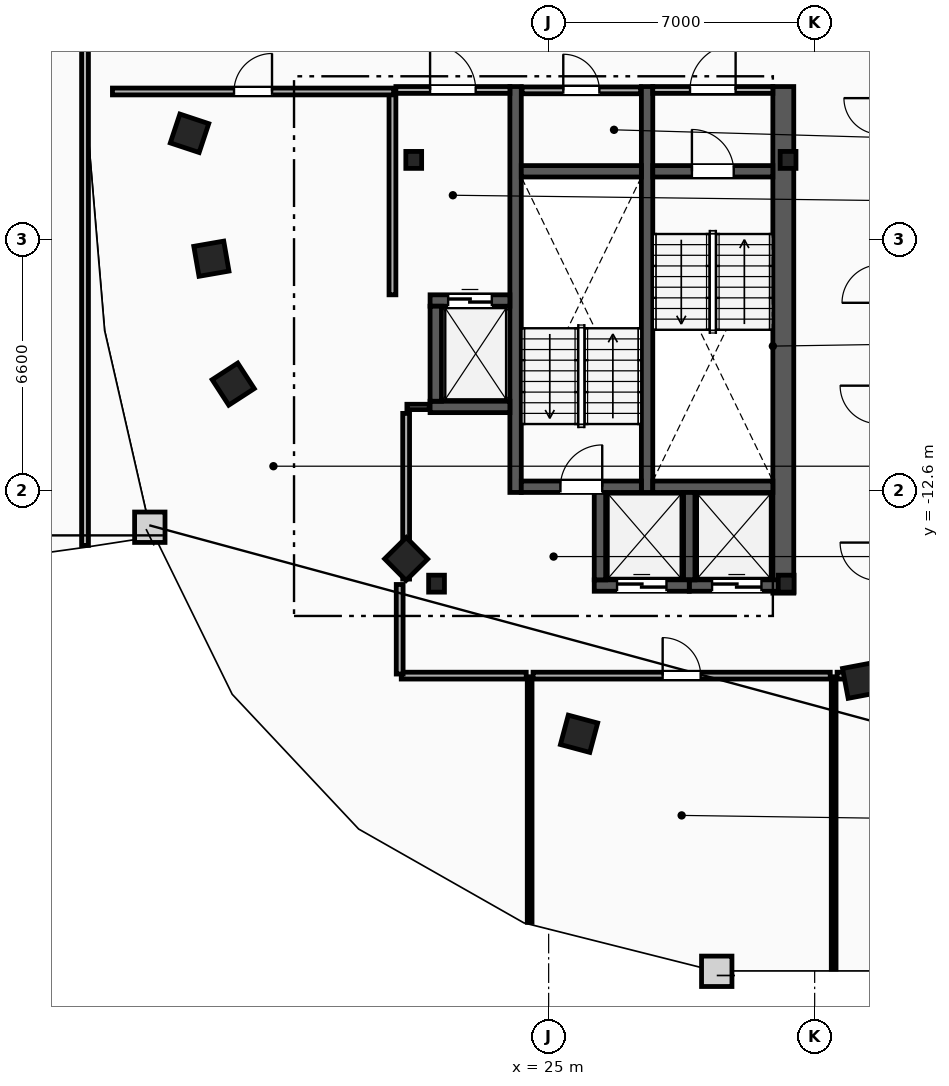
"""IFC4 building model, lengths in metres.
Left out: names, types, materials, properties, quantities, classifications, styles, units other than length and angle.
Written with IfcOpenShell. Run it as: python <this file> out.ifc"""

import sys

from ifc_helpers import new_model, si_unit, direction, frame, frame_2d, origin, origin_2d, place, context, subcontext, project, spatial, rectangle, i_section, extrude, element, fill, save


model = new_model("IFC4")
c1 = context("Model", 3, precision=1e-05, world=origin(), true_north=direction((0.0, 1.0)))
c2 = subcontext(c1, "Body", "Model", "MODEL_VIEW")
j1 = project(units=[si_unit("LENGTHUNIT", "METRE"), si_unit("PLANEANGLEUNIT", "RADIAN")], contexts=[c1])
p1 = place(None, origin())
s1 = spatial("IfcSite", under=j1, at=p1, CompositionType="ELEMENT")
p2 = place(p1, origin())
s2 = spatial("IfcBuilding", under=s1, at=p2, CompositionType="ELEMENT")
p3 = place(p2, frame((0.0, 0.0, 264.8)))
s3 = spatial("IfcBuildingStorey", under=s2, at=p3, CompositionType="ELEMENT", Elevation=264.8)
for number, where, z_axis, x_axis in (
    (1, (31.3, -3.9, 0.0), (0.0, 0.0, 1.0), (1.0, 0.0, 0.0)),
    (2, (21.45, -3.9, 0.0), (0.0, 0.0, 1.0), (1.0, 0.0, 0.0)),
    (3, (22.05, -15.05, 0.0), (0.0, 0.0, 1.0), (1.0, 0.0, 0.0)),
    (4, (31.25, -15.05, 0.0), (0.0, 0.0, 1.0), (1.0, 0.0, 0.0)),
):
    element("IfcColumn", number, at=place(p3, frame(where, z_axis=z_axis, x_axis=x_axis)), inside=s3, PredefinedType="COLUMN", context=c2, shape_type="SweptSolid", body=[
        extrude(i_section(OverallWidth=0.416, OverallDepth=0.446, WebThickness=0.039, FlangeThickness=0.063, FilletRadius=0.018, at=origin_2d()), origin(), (0.0, 0.0, 1.0), 3.6),
    ])
for number, where, z_axis, x_axis in (
    (5, (15.55, -3.2, 0.0), (0.0, 0.0, 1.0), (-0.315, -0.949, 0.0)),
    (6, (16.125, -6.5, 0.0), (0.0, 0.0, 1.0), (0.172, -0.985, 0.0)),
    (7, (16.7, -9.8, 0.0), (0.0, 0.0, 1.0), (0.544, -0.839, 0.0)),
    (8, (21.25, -14.4, 0.0), (0.0, 0.0, 1.0), (0.703, -0.711, 0.0)),
    (9, (25.8, -19.0, 0.0), (0.0, 0.0, 1.0), (0.966, -0.259, 0.0)),
    (10, (33.2, -17.6, 0.0), (0.0, 0.0, 1.0), (0.983, 0.186, 0.0)),
):
    element("IfcColumn", number, at=place(p3, frame(where, z_axis=z_axis, x_axis=x_axis)), inside=s3, PredefinedType="COLUMN", context=c2, shape_type="SweptSolid", body=[
        extrude(rectangle(XDim=0.8, YDim=0.8, at=origin_2d()), origin(), (0.0, 0.0, 1.0), 3.6),
    ])
p4 = place(p3, frame((31.175, -15.3, 0.0), z_axis=(0.0, 0.0, 1.0), x_axis=(0.0, 1.0, 0.0)))
e11 = element("IfcWall", 11, at=p4, inside=s3, PredefinedType="SHEAR", context=c2, shape_type="SweptSolid", body=[
    extrude(rectangle(XDim=13.33, YDim=0.55, at=frame_2d((6.665, 0.0))), origin(), (0.0, 0.0, 1.0), 3.34),
])
for number, where, z_axis, x_axis in (
    (12, (27.59, -12.65, 0.0), (0.0, 0.0, 1.0), (0.0, 1.0, 0.0)),
    (13, (24.13, -12.65, 0.0), (0.0, 0.0, 1.0), (0.0, 1.0, 0.0)),
):
    element("IfcWall", number, at=place(p3, frame(where, z_axis=z_axis, x_axis=x_axis)), inside=s3, PredefinedType="SHEAR", context=c2, shape_type="SweptSolid", body=[
        extrude(rectangle(XDim=10.68, YDim=0.3, at=frame_2d((5.34, 0.0))), origin(), (0.0, 0.0, 1.0), 3.34),
    ])
p5 = place(p3, frame((27.74, -4.2, 0.0), z_axis=(0.0, 0.0, 1.0), x_axis=(1.0, 0.0, 0.0)))
e14 = element("IfcWall", 14, at=p5, inside=s3, PredefinedType="SHEAR", context=c2, shape_type="SweptSolid", body=[
    extrude(rectangle(XDim=3.16, YDim=0.3, at=frame_2d((1.58, 0.0))), origin(), (0.0, 0.0, 1.0), 3.34),
])
p6 = place(p5, frame((1.03, 0.0, 0.0)))
e15 = element("IfcOpeningElement", 15, at=p6, cuts=e14, PredefinedType="OPENING", context=c2, shape_type="SweptSolid", body=[
    extrude(rectangle(XDim=1.1, YDim=2.15, at=frame_2d((0.55, 1.075))), frame((0.0, 0.16, 0.0), z_axis=(0.0, -1.0, 0.0), x_axis=(1.0, 0.0, 0.0)), (0.0, 0.0, 1.0), 0.32),
])
p7 = place(p3, frame((27.74, -12.5, 0.0), z_axis=(0.0, 0.0, 1.0), x_axis=(1.0, 0.0, 0.0)))
e16 = element("IfcWall", 16, at=p7, inside=s3, PredefinedType="SHEAR", context=c2, shape_type="SweptSolid", body=[
    extrude(rectangle(XDim=3.16, YDim=0.3, at=frame_2d((1.58, 0.0))), origin(), (0.0, 0.0, 1.0), 3.34),
])
p8 = place(p3, frame((24.28, -12.5, 0.0), z_axis=(0.0, 0.0, 1.0), x_axis=(1.0, 0.0, 0.0)))
e17 = element("IfcWall", 17, at=p8, inside=s3, PredefinedType="SHEAR", context=c2, shape_type="SweptSolid", body=[
    extrude(rectangle(XDim=3.16, YDim=0.3, at=frame_2d((1.58, 0.0))), origin(), (0.0, 0.0, 1.0), 3.34),
])
p9 = place(p8, frame((1.03, 0.0, 0.0)))
e18 = element("IfcOpeningElement", 18, at=p9, cuts=e17, PredefinedType="OPENING", context=c2, shape_type="SweptSolid", body=[
    extrude(rectangle(XDim=1.1, YDim=2.15, at=frame_2d((0.55, 1.075))), frame((0.0, 0.16, 0.0), z_axis=(0.0, -1.0, 0.0), x_axis=(1.0, 0.0, 0.0)), (0.0, 0.0, 1.0), 0.32),
])
p10 = place(p3, frame((24.28, -4.2, 0.0), z_axis=(0.0, 0.0, 1.0), x_axis=(1.0, 0.0, 0.0)))
e19 = element("IfcWall", 19, at=p10, inside=s3, PredefinedType="SHEAR", context=c2, shape_type="SweptSolid", body=[
    extrude(rectangle(XDim=3.16, YDim=0.3, at=frame_2d((1.58, 0.0))), origin(), (0.0, 0.0, 1.0), 3.34),
])
p11 = place(p3, frame((20.89, -7.45, 0.0), z_axis=(0.0, 0.0, 1.0), x_axis=(0.0, 1.0, 0.0)))
e20 = element("IfcWall", 20, at=p11, inside=s3, PredefinedType="PARTITIONING", context=c2, shape_type="SweptSolid", body=[
    extrude(rectangle(XDim=5.3, YDim=0.18, at=frame_2d((2.65, 0.0))), origin(), (0.0, 0.0, 1.0), 3.34),
])
p12 = place(p3, frame((20.98, -2.06, 0.0), z_axis=(0.0, 0.0, 1.0), x_axis=(1.0, 0.0, 0.0)))
e21 = element("IfcWall", 21, at=p12, inside=s3, PredefinedType="PARTITIONING", context=c2, shape_type="SweptSolid", body=[
    extrude(rectangle(XDim=3.0, YDim=0.18, at=frame_2d((1.5, 0.0))), origin(), (0.0, 0.0, 1.0), 3.34),
])
p13 = place(p12, frame((0.9, 0.0, 0.0)))
e22 = element("IfcOpeningElement", 22, at=p13, cuts=e21, PredefinedType="OPENING", context=c2, shape_type="SweptSolid", body=[
    extrude(rectangle(XDim=1.2, YDim=2.15, at=frame_2d((0.6, 1.075))), frame((0.0, 0.1, 0.0), z_axis=(0.0, -1.0, 0.0), x_axis=(1.0, 0.0, 0.0)), (0.0, 0.0, 1.0), 0.2),
])
p14 = place(p3, frame((27.74, -2.06, 0.0), z_axis=(0.0, 0.0, 1.0), x_axis=(1.0, 0.0, 0.0)))
e23 = element("IfcWall", 23, at=p14, inside=s3, PredefinedType="PARTITIONING", context=c2, shape_type="SweptSolid", body=[
    extrude(rectangle(XDim=3.16, YDim=0.18, at=frame_2d((1.58, 0.0))), origin(), (0.0, 0.0, 1.0), 3.34),
])
p15 = place(p14, frame((0.98, 0.0, 0.0)))
e24 = element("IfcOpeningElement", 24, at=p15, cuts=e23, PredefinedType="OPENING", context=c2, shape_type="SweptSolid", body=[
    extrude(rectangle(XDim=1.2, YDim=2.15, at=frame_2d((0.6, 1.075))), frame((0.0, 0.1, 0.0), z_axis=(0.0, -1.0, 0.0), x_axis=(1.0, 0.0, 0.0)), (0.0, 0.0, 1.0), 0.2),
])
p16 = place(p3, frame((21.88, -7.6, 0.0), z_axis=(0.0, 0.0, 1.0), x_axis=(1.0, 0.0, 0.0)))
e25 = element("IfcWall", 25, at=p16, inside=s3, PredefinedType="SHEAR", context=c2, shape_type="SweptSolid", body=[
    extrude(rectangle(XDim=2.1, YDim=0.3, at=frame_2d((1.05, 0.0))), origin(), (0.0, 0.0, 1.0), 3.34),
])
p17 = place(p16, frame((0.475, 0.0, 0.0)))
e26 = element("IfcOpeningElement", 26, at=p17, cuts=e25, PredefinedType="OPENING", context=c2, shape_type="SweptSolid", body=[
    extrude(rectangle(XDim=1.15, YDim=2.2, at=frame_2d((0.575, 1.1))), frame((0.0, 0.16, 0.0), z_axis=(0.0, -1.0, 0.0), x_axis=(1.0, 0.0, 0.0)), (0.0, 0.0, 1.0), 0.32),
])
p18 = place(p3, frame((21.88, -10.4, 0.0), z_axis=(0.0, 0.0, 1.0), x_axis=(1.0, 0.0, 0.0)))
e27 = element("IfcWall", 27, at=p18, inside=s3, PredefinedType="SHEAR", context=c2, shape_type="SweptSolid", body=[
    extrude(rectangle(XDim=2.1, YDim=0.3, at=frame_2d((1.05, 0.0))), origin(), (0.0, 0.0, 1.0), 3.34),
])
p19 = place(p3, frame((22.03, -10.25, 0.0), z_axis=(0.0, 0.0, 1.0), x_axis=(0.0, 1.0, 0.0)))
e28 = element("IfcWall", 28, at=p19, inside=s3, PredefinedType="SHEAR", context=c2, shape_type="SweptSolid", body=[
    extrude(rectangle(XDim=2.5, YDim=0.3, at=frame_2d((1.25, 0.0))), origin(), (0.0, 0.0, 1.0), 3.34),
])
p20 = place(p3, frame((28.7, -15.1, 0.0), z_axis=(0.0, 0.0, 1.0), x_axis=(1.0, 0.0, 0.0)))
e29 = element("IfcWall", 29, at=p20, inside=s3, PredefinedType="SHEAR", context=c2, shape_type="SweptSolid", body=[
    extrude(rectangle(XDim=2.5, YDim=0.3, at=frame_2d((1.25, 0.0))), origin(), (0.0, 0.0, 1.0), 3.34),
])
p21 = place(p20, frame((0.6, 0.0, 0.0)))
e30 = element("IfcOpeningElement", 30, at=p21, cuts=e29, PredefinedType="OPENING", context=c2, shape_type="SweptSolid", body=[
    extrude(rectangle(XDim=1.3, YDim=2.2, at=frame_2d((0.65, 1.1))), frame((0.0, 0.16, 0.0), z_axis=(0.0, -1.0, 0.0), x_axis=(1.0, 0.0, 0.0)), (0.0, 0.0, 1.0), 0.32),
])
p22 = place(p3, frame((28.7, -14.95, 0.0), z_axis=(0.0, 0.0, 1.0), x_axis=(0.0, 1.0, 0.0)))
e31 = element("IfcWall", 31, at=p22, inside=s3, PredefinedType="SHEAR", context=c2, shape_type="SweptSolid", body=[
    extrude(rectangle(XDim=2.3, YDim=0.3, at=frame_2d((1.15, 0.0))), origin(), (0.0, 0.0, 1.0), 3.34),
])
p23 = place(p3, frame((26.2, -15.1, 0.0), z_axis=(0.0, 0.0, 1.0), x_axis=(1.0, 0.0, 0.0)))
e32 = element("IfcWall", 32, at=p23, inside=s3, PredefinedType="SHEAR", context=c2, shape_type="SweptSolid", body=[
    extrude(rectangle(XDim=2.5, YDim=0.3, at=frame_2d((1.25, 0.0))), origin(), (0.0, 0.0, 1.0), 3.34),
])
p24 = place(p23, frame((0.6, 0.0, 0.0)))
e33 = element("IfcOpeningElement", 33, at=p24, cuts=e32, PredefinedType="OPENING", context=c2, shape_type="SweptSolid", body=[
    extrude(rectangle(XDim=1.3, YDim=2.2, at=frame_2d((0.65, 1.1))), frame((0.0, 0.16, 0.0), z_axis=(0.0, -1.0, 0.0), x_axis=(1.0, 0.0, 0.0)), (0.0, 0.0, 1.0), 0.32),
])
p25 = place(p3, frame((26.35, -14.95, 0.0), z_axis=(0.0, 0.0, 1.0), x_axis=(0.0, 1.0, 0.0)))
e34 = element("IfcWall", 34, at=p25, inside=s3, PredefinedType="SHEAR", context=c2, shape_type="SweptSolid", body=[
    extrude(rectangle(XDim=2.3, YDim=0.3, at=frame_2d((1.15, 0.0))), origin(), (0.0, 0.0, 1.0), 3.34),
])
p26 = place(p3, frame((21.27, -10.4, 0.0), z_axis=(0.0, 0.0, 1.0), x_axis=(1.0, 0.0, 0.0)))
e35 = element("IfcWall", 35, at=p26, inside=s3, PredefinedType="PARTITIONING", context=c2, shape_type="SweptSolid", body=[
    extrude(rectangle(XDim=0.59, YDim=0.14, at=frame_2d((0.295, 0.0))), origin(), (0.0, 0.0, 1.0), 3.34),
])
p27 = place(p3, frame((21.25, -14.93, 0.0), z_axis=(0.0, 0.0, 1.0), x_axis=(0.0, 1.0, 0.0)))
e36 = element("IfcWall", 36, at=p27, inside=s3, PredefinedType="PARTITIONING", context=c2, shape_type="SweptSolid", body=[
    extrude(rectangle(XDim=4.36, YDim=0.18, at=frame_2d((2.18, 0.0))), origin(), (0.0, 0.0, 1.0), 3.34),
])
p28 = place(p3, frame((24.3, -2.07, 0.0), z_axis=(0.0, 0.0, 1.0), x_axis=(1.0, 0.0, 0.0)))
e37 = element("IfcWall", 37, at=p28, inside=s3, PredefinedType="PARTITIONING", context=c2, shape_type="SweptSolid", body=[
    extrude(rectangle(XDim=3.12, YDim=0.18, at=frame_2d((1.56, 0.0))), origin(), (0.0, 0.0, 1.0), 3.34),
])
p29 = place(p28, frame((1.085, 0.0, 0.0)))
e38 = element("IfcOpeningElement", 38, at=p29, cuts=e37, PredefinedType="OPENING", context=c2, shape_type="SweptSolid", body=[
    extrude(rectangle(XDim=0.95, YDim=2.1, at=frame_2d((0.475, 1.05))), frame((0.0, 0.1, 0.0), z_axis=(0.0, -1.0, 0.0), x_axis=(1.0, 0.0, 0.0)), (0.0, 0.0, 1.0), 0.2),
])
p30 = place(p3, frame((24.5, -23.963, 0.0), z_axis=(0.0, 0.0, 1.0), x_axis=(0.0, 1.0, 0.0)))
e39 = element("IfcWall", 39, at=p30, inside=s3, PredefinedType="PARTITIONING", context=c2, shape_type="SweptSolid", body=[
    extrude(rectangle(XDim=6.463, YDim=0.125, at=frame_2d((3.231, 0.0))), origin(), (0.0, 0.0, 1.0), 3.34),
])
p31 = place(p3, frame((32.5, -25.19, 0.0), z_axis=(0.0, 0.0, 1.0), x_axis=(0.0, 1.0, 0.0)))
e40 = element("IfcWall", 40, at=p31, inside=s3, PredefinedType="PARTITIONING", context=c2, shape_type="SweptSolid", body=[
    extrude(rectangle(XDim=7.69, YDim=0.125, at=frame_2d((3.845, 0.0))), origin(), (0.0, 0.0, 1.0), 3.34),
])
p32 = place(p3, frame((24.59, -17.47, 0.0), z_axis=(0.0, 0.0, 1.0), x_axis=(1.0, 0.0, 0.0)))
e41 = element("IfcWall", 41, at=p32, inside=s3, PredefinedType="PARTITIONING", context=c2, shape_type="SweptSolid", body=[
    extrude(rectangle(XDim=7.82, YDim=0.18, at=frame_2d((3.91, 0.0))), origin(), (0.0, 0.0, 1.0), 3.34),
])
p33 = place(p32, frame((3.41, 0.0, 0.0)))
e42 = element("IfcOpeningElement", 42, at=p33, cuts=e41, PredefinedType="OPENING", context=c2, shape_type="SweptSolid", body=[
    extrude(rectangle(XDim=1.0, YDim=2.15, at=frame_2d((0.5, 1.075))), frame((0.0, 0.1, 0.0), z_axis=(0.0, -1.0, 0.0), x_axis=(1.0, 0.0, 0.0)), (0.0, 0.0, 1.0), 0.2),
])
p34 = place(p3, frame((32.59, -17.47, 0.0), z_axis=(0.0, 0.0, 1.0), x_axis=(1.0, 0.0, 0.0)))
e43 = element("IfcWall", 43, at=p34, inside=s3, PredefinedType="PARTITIONING", context=c2, shape_type="SweptSolid", body=[
    extrude(rectangle(XDim=1.038, YDim=0.18, at=frame_2d((0.519, 0.0))), origin(), (0.0, 0.0, 1.0), 3.34),
])
p35 = place(p3, frame((13.521, -2.1, 0.0), z_axis=(0.0, 0.0, 1.0), x_axis=(1.0, 0.0, 0.0)))
e44 = element("IfcWall", 44, at=p35, inside=s3, PredefinedType="PARTITIONING", context=c2, shape_type="SweptSolid", body=[
    extrude(rectangle(XDim=7.398, YDim=0.18, at=frame_2d((3.699, 0.0))), origin(), (0.0, 0.0, 1.0), 3.34),
])
p36 = place(p35, frame((3.199, 0.0, 0.0)))
e45 = element("IfcOpeningElement", 45, at=p36, cuts=e44, PredefinedType="OPENING", context=c2, shape_type="SweptSolid", body=[
    extrude(rectangle(XDim=1.0, YDim=2.15, at=frame_2d((0.5, 1.075))), frame((0.0, 0.1, 0.0), z_axis=(0.0, -1.0, 0.0), x_axis=(1.0, 0.0, 0.0)), (0.0, 0.0, 1.0), 0.2),
])
p37 = place(p3, frame((21.122, -17.47, 0.0), z_axis=(0.0, 0.0, 1.0), x_axis=(1.0, 0.0, 0.0)))
e46 = element("IfcWall", 46, at=p37, inside=s3, PredefinedType="PARTITIONING", context=c2, shape_type="SweptSolid", body=[
    extrude(rectangle(XDim=3.288, YDim=0.18, at=frame_2d((1.644, 0.0))), origin(), (0.0, 0.0, 1.0), 3.34),
])
p38 = place(p3, frame((21.08, -15.072, 0.0), z_axis=(0.0, 0.0, 1.0), x_axis=(0.0, -1.0, 0.0)))
e47 = element("IfcWall", 47, at=p38, inside=s3, PredefinedType="PARTITIONING", context=c2, shape_type="SweptSolid", body=[
    extrude(rectangle(XDim=2.357, YDim=0.18, at=frame_2d((1.178, 0.0))), origin(), (0.0, 0.0, 1.0), 3.34),
])
p39 = place(p3, frame((12.8, -14.044, 0.0), z_axis=(0.0, 0.0, 1.0), x_axis=(0.0, 1.0, 0.0)))
e48 = element("IfcWall", 48, at=p39, inside=s3, PredefinedType="PARTITIONING", context=c2, shape_type="SweptSolid", body=[
    extrude(rectangle(XDim=15.204, YDim=0.18, at=frame_2d((7.602, 0.0))), origin(), (0.0, 0.0, 1.0), 3.34),
])
p40 = place(p6, origin())
e49 = element("IfcDoor", 49, at=p40, inside=s3, OperationType="SINGLE_SWING_LEFT", PredefinedType="DOOR", context=c2, shape_type="SweptSolid", body=[
    extrude(rectangle(XDim=1.1, YDim=2.15, at=frame_2d((0.55, 1.075))), frame((0.0, 0.025, 0.0), z_axis=(0.0, -1.0, 0.0), x_axis=(1.0, 0.0, 0.0)), (0.0, 0.0, 1.0), 0.05),
])
fill(e15, e49)
p41 = place(p9, origin())
e50 = element("IfcDoor", 50, at=p41, inside=s3, OperationType="SINGLE_SWING_RIGHT", PredefinedType="DOOR", context=c2, shape_type="SweptSolid", body=[
    extrude(rectangle(XDim=1.1, YDim=2.15, at=frame_2d((0.55, 1.075))), frame((0.0, 0.025, 0.0), z_axis=(0.0, -1.0, 0.0), x_axis=(1.0, 0.0, 0.0)), (0.0, 0.0, 1.0), 0.05),
])
fill(e18, e50)
p42 = place(p13, origin())
e51 = element("IfcDoor", 51, at=p42, inside=s3, OperationType="SINGLE_SWING_LEFT", PredefinedType="DOOR", context=c2, shape_type="SweptSolid", body=[
    extrude(rectangle(XDim=1.2, YDim=2.15, at=frame_2d((0.6, 1.075))), frame((0.0, 0.025, 0.0), z_axis=(0.0, -1.0, 0.0), x_axis=(1.0, 0.0, 0.0)), (0.0, 0.0, 1.0), 0.05),
])
fill(e22, e51)
p43 = place(p15, origin())
e52 = element("IfcDoor", 52, at=p43, inside=s3, OperationType="SINGLE_SWING_RIGHT", PredefinedType="DOOR", context=c2, shape_type="SweptSolid", body=[
    extrude(rectangle(XDim=1.2, YDim=2.15, at=frame_2d((0.6, 1.075))), frame((0.0, 0.025, 0.0), z_axis=(0.0, -1.0, 0.0), x_axis=(1.0, 0.0, 0.0)), (0.0, 0.0, 1.0), 0.05),
])
fill(e24, e52)
p44 = place(p17, origin())
e53 = element("IfcDoor", 53, at=p44, inside=s3, OperationType="SLIDING_TO_LEFT", PredefinedType="TRAPDOOR", context=c2, shape_type="SweptSolid", body=[
    extrude(rectangle(XDim=1.15, YDim=2.2, at=frame_2d((0.575, 1.1))), frame((0.0, 0.025, 0.0), z_axis=(0.0, -1.0, 0.0), x_axis=(1.0, 0.0, 0.0)), (0.0, 0.0, 1.0), 0.05),
])
fill(e26, e53)
p45 = place(p21, origin())
e54 = element("IfcDoor", 54, at=p45, inside=s3, OperationType="SLIDING_TO_LEFT", PredefinedType="TRAPDOOR", context=c2, shape_type="SweptSolid", body=[
    extrude(rectangle(XDim=1.3, YDim=2.2, at=frame_2d((0.65, 1.1))), frame((0.0, 0.025, 0.0), z_axis=(0.0, -1.0, 0.0), x_axis=(1.0, 0.0, 0.0)), (0.0, 0.0, 1.0), 0.05),
])
fill(e30, e54)
p46 = place(p24, origin())
e55 = element("IfcDoor", 55, at=p46, inside=s3, OperationType="SLIDING_TO_LEFT", PredefinedType="TRAPDOOR", context=c2, shape_type="SweptSolid", body=[
    extrude(rectangle(XDim=1.3, YDim=2.2, at=frame_2d((0.65, 1.1))), frame((0.0, 0.025, 0.0), z_axis=(0.0, -1.0, 0.0), x_axis=(1.0, 0.0, 0.0)), (0.0, 0.0, 1.0), 0.05),
])
fill(e33, e55)
p47 = place(p33, origin())
e56 = element("IfcDoor", 56, at=p47, inside=s3, OperationType="SINGLE_SWING_LEFT", PredefinedType="DOOR", context=c2, shape_type="SweptSolid", body=[
    extrude(rectangle(XDim=1.0, YDim=2.15, at=frame_2d((0.5, 1.075))), frame((0.0, 0.025, 0.0), z_axis=(0.0, -1.0, 0.0), x_axis=(1.0, 0.0, 0.0)), (0.0, 0.0, 1.0), 0.05),
])
fill(e42, e56)
p48 = place(p36, origin())
e57 = element("IfcDoor", 57, at=p48, inside=s3, OperationType="SINGLE_SWING_RIGHT", PredefinedType="DOOR", context=c2, shape_type="SweptSolid", body=[
    extrude(rectangle(XDim=1.0, YDim=2.15, at=frame_2d((0.5, 1.075))), frame((0.0, 0.025, 0.0), z_axis=(0.0, -1.0, 0.0), x_axis=(1.0, 0.0, 0.0)), (0.0, 0.0, 1.0), 0.05),
])
fill(e45, e57)
p49 = place(p29, origin())
e58 = element("IfcDoor", 58, at=p49, inside=s3, OperationType="SINGLE_SWING_LEFT", PredefinedType="DOOR", context=c2, shape_type="SweptSolid", body=[
    extrude(rectangle(XDim=0.95, YDim=2.1, at=frame_2d((0.475, 1.05))), frame((0.0, 0.025, 0.0), z_axis=(0.0, -1.0, 0.0), x_axis=(1.0, 0.0, 0.0)), (0.0, 0.0, 1.0), 0.05),
])
fill(e38, e58)
save(model, sys.argv[1])
